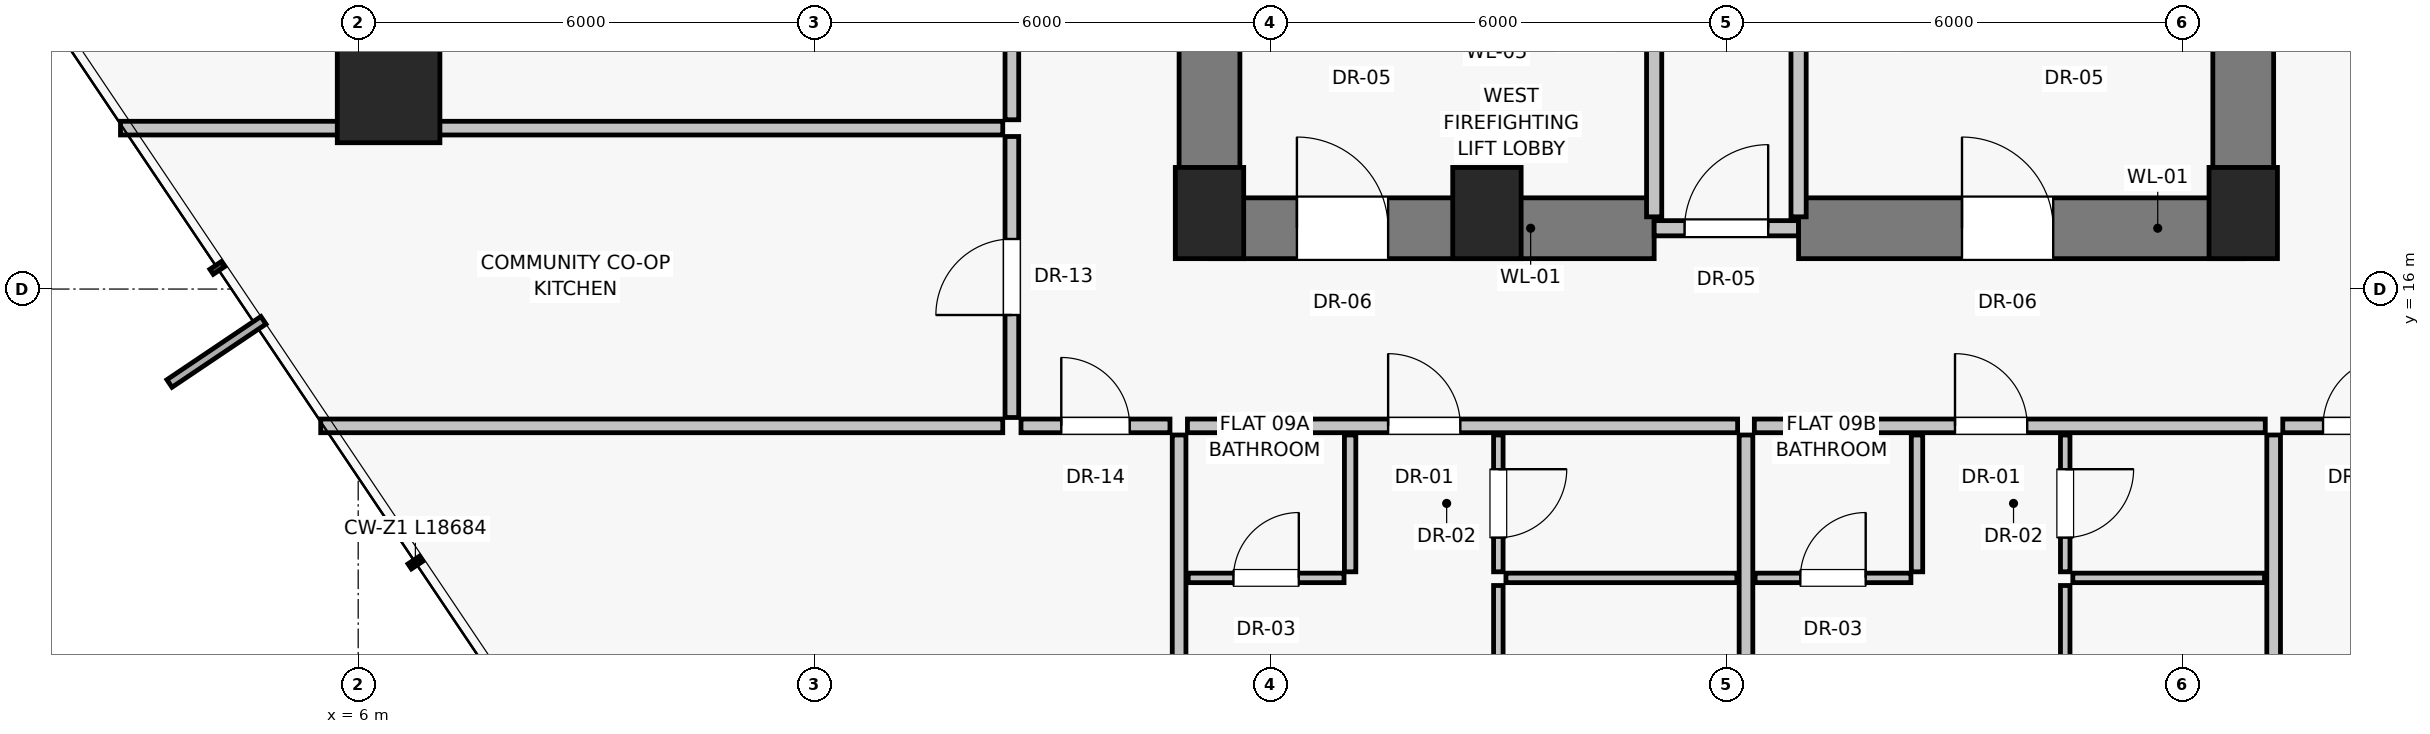
"""IFC4 building model, lengths in metres.
Left out: names, types, materials, properties, quantities, classifications, styles, units other than length and angle.
Written with IfcOpenShell. Run it as: python <this file> out.ifc"""

import sys

from ifc_helpers import new_model, si_unit, direction, frame, frame_2d, origin, origin_2d, place, context, subcontext, project, spatial, rectangle, extrude, source, transform, mapped, element, fill, save


model = new_model("IFC4")
c1 = context("Model", 3, precision=1e-05, world=origin(), true_north=direction((0.0, 1.0)))
c2 = subcontext(c1, "Body", "Model", "MODEL_VIEW")
j1 = project(units=[si_unit("LENGTHUNIT", "METRE"), si_unit("PLANEANGLEUNIT", "RADIAN")], contexts=[c1])
p1 = place(None, origin())
s1 = spatial("IfcSite", under=j1, at=p1, CompositionType="ELEMENT")
p2 = place(p1, origin())
s2 = spatial("IfcBuilding", under=s1, at=p2, CompositionType="ELEMENT")
p3 = place(p2, frame((0.0, 0.0, 37.05)))
s3 = spatial("IfcBuildingStorey", under=s2, at=p3, CompositionType="ELEMENT", Elevation=37.05)
for number, where, z_axis, x_axis in (
    (1, (17.2, 17.0, 0.0), (0.0, 0.0, 1.0), (1.0, 0.0, 0.0)),
    (2, (20.85, 17.0, 0.0), (0.0, 0.0, 1.0), (1.0, 0.0, 0.0)),
    (3, (30.8, 17.0, 0.0), (0.0, 0.0, 1.0), (1.0, 0.0, 0.0)),
):
    element("IfcColumn", number, at=place(p3, frame(where, z_axis=z_axis, x_axis=x_axis)), inside=s3, PredefinedType="PILASTER", context=c2, shape_type="SweptSolid", body=[
        extrude(rectangle(XDim=0.9, YDim=1.2, at=origin_2d()), origin(), (0.0, 0.0, 1.0), 3.25),
    ])
p4 = place(p3, frame((6.4, 18.6, 0.0), z_axis=(0.0, 0.0, 1.0), x_axis=(1.0, 0.0, 0.0)))
e4 = element("IfcColumn", 4, at=p4, inside=s3, PredefinedType="COLUMN", context=c2, shape_type="SweptSolid", body=[
    extrude(rectangle(XDim=1.35, YDim=1.35, at=origin_2d()), origin(), (0.0, 0.0, 1.0), 3.25),
])
for number, where, z_axis, x_axis in (
    (5, (17.2, 16.8, 0.0), (0.0, 0.0, 1.0), (0.0, 1.0, 0.0)),
    (6, (30.8, 16.8, 0.0), (0.0, 0.0, 1.0), (0.0, 1.0, 0.0)),
):
    element("IfcWall", number, at=place(p3, frame(where, z_axis=z_axis, x_axis=x_axis)), inside=s3, PredefinedType="SHEAR", context=c2, shape_type="SweptSolid", body=[
        extrude(rectangle(XDim=14.2, YDim=0.8, at=frame_2d((7.1, 0.0))), origin(), (0.0, 0.0, 1.0), 3.0),
    ])
p5 = place(p3, frame((17.2, 16.8, 0.0), z_axis=(0.0, 0.0, 1.0), x_axis=(1.0, 0.0, 0.0)))
e7 = element("IfcWall", 7, at=p5, inside=s3, PredefinedType="SHEAR", context=c2, shape_type="SweptSolid", body=[
    extrude(rectangle(XDim=5.85, YDim=0.8, at=frame_2d((2.925, 0.0))), origin(), (0.0, 0.0, 1.0), 3.0),
])
p6 = place(p5, frame((1.15, 0.0, 0.0)))
e8 = element("IfcOpeningElement", 8, at=p6, cuts=e7, PredefinedType="OPENING", context=c2, shape_type="SweptSolid", body=[
    extrude(rectangle(XDim=1.2, YDim=2.03, at=frame_2d((0.6, 1.015))), frame((0.0, 0.41, 0.0), z_axis=(0.0, -1.0, 0.0), x_axis=(1.0, 0.0, 0.0)), (0.0, 0.0, 1.0), 0.82),
])
p7 = place(p3, frame((23.05, 16.8, 0.0), z_axis=(0.0, 0.0, 1.0), x_axis=(1.0, 0.0, 0.0)))
e9 = element("IfcWall", 9, at=p7, inside=s3, PredefinedType="SOLIDWALL", context=c2, shape_type="SweptSolid", body=[
    extrude(rectangle(XDim=1.9, YDim=0.2, at=frame_2d((0.95, 0.0))), origin(), (0.0, 0.0, 1.0), 2.15),
])
p8 = place(p7, frame((0.4, 0.0, 0.0)))
e10 = element("IfcOpeningElement", 10, at=p8, cuts=e9, PredefinedType="OPENING", context=c2, shape_type="SweptSolid", body=[
    extrude(rectangle(XDim=1.1, YDim=2.03, at=frame_2d((0.55, 1.015))), frame((0.0, 0.11, 0.0), z_axis=(0.0, -1.0, 0.0), x_axis=(1.0, 0.0, 0.0)), (0.0, 0.0, 1.0), 0.22),
])
p9 = place(p3, frame((24.95, 16.8, 0.0), z_axis=(0.0, 0.0, 1.0), x_axis=(1.0, 0.0, 0.0)))
e11 = element("IfcWall", 11, at=p9, inside=s3, PredefinedType="SHEAR", context=c2, shape_type="SweptSolid", body=[
    extrude(rectangle(XDim=5.85, YDim=0.8, at=frame_2d((2.925, 0.0))), origin(), (0.0, 0.0, 1.0), 3.0),
])
p10 = place(p9, frame((2.15, 0.0, 0.0)))
e12 = element("IfcOpeningElement", 12, at=p10, cuts=e11, PredefinedType="OPENING", context=c2, shape_type="SweptSolid", body=[
    extrude(rectangle(XDim=1.2, YDim=2.03, at=frame_2d((0.6, 1.015))), frame((0.0, 0.41, 0.0), z_axis=(0.0, -1.0, 0.0), x_axis=(1.0, 0.0, 0.0)), (0.0, 0.0, 1.0), 0.82),
])
for number, where, z_axis, x_axis in (
    (13, (23.05, 16.95, 0.0), (0.0, 0.0, 1.0), (0.0, 1.0, 0.0)),
    (14, (24.95, 16.95, 0.0), (0.0, 0.0, 1.0), (0.0, 1.0, 0.0)),
):
    element("IfcWall", number, at=place(p3, frame(where, z_axis=z_axis, x_axis=x_axis)), inside=s3, PredefinedType="SOLIDWALL", context=c2, shape_type="SweptSolid", body=[
        extrude(rectangle(XDim=5.6, YDim=0.2, at=frame_2d((2.8, 0.0))), origin(), (0.0, 0.0, 1.0), 3.0),
    ])
p11 = place(p3, frame((16.8, 14.08, 0.0), z_axis=(0.0, 0.0, 1.0), x_axis=(0.0, -1.0, 0.0)))
e15 = element("IfcWall", 15, at=p11, inside=s3, PredefinedType="PARTITIONING", context=c2, shape_type="SweptSolid", body=[
    extrude(rectangle(XDim=11.437, YDim=0.18, at=frame_2d((5.718, 0.0))), origin(), (0.0, 0.0, 1.0), 3.0),
])
p12 = place(p3, frame((31.2, 14.08, 0.0), z_axis=(0.0, 0.0, 1.0), x_axis=(0.0, -1.0, 0.0)))
e16 = element("IfcWall", 16, at=p12, inside=s3, PredefinedType="PARTITIONING", context=c2, shape_type="SweptSolid", body=[
    extrude(rectangle(XDim=10.45, YDim=0.18, at=frame_2d((5.225, 0.0))), origin(), (0.0, 0.0, 1.0), 3.0),
])
p13 = place(p3, frame((16.91, 14.2, 0.0), z_axis=(0.0, 0.0, 1.0), x_axis=(1.0, 0.0, 0.0)))
e17 = element("IfcWall", 17, at=p13, inside=s3, PredefinedType="PARTITIONING", context=c2, shape_type="SweptSolid", body=[
    extrude(rectangle(XDim=7.238, YDim=0.18, at=frame_2d((3.619, 0.0))), origin(), (0.0, 0.0, 1.0), 3.0),
])
p14 = place(p13, frame((2.64, 0.0, 0.0)))
e18 = element("IfcOpeningElement", 18, at=p14, cuts=e17, PredefinedType="OPENING", context=c2, shape_type="SweptSolid", body=[
    extrude(rectangle(XDim=0.95, YDim=2.02, at=frame_2d((0.475, 1.01))), frame((0.0, 0.1, 0.0), z_axis=(0.0, -1.0, 0.0), x_axis=(1.0, 0.0, 0.0)), (0.0, 0.0, 1.0), 0.2),
])
p15 = place(p3, frame((19.05, 14.08, 0.0), z_axis=(0.0, 0.0, 1.0), x_axis=(0.0, -1.0, 0.0)))
e19 = element("IfcWall", 19, at=p15, inside=s3, PredefinedType="PARTITIONING", context=c2, shape_type="SweptSolid", body=[
    extrude(rectangle(XDim=1.8, YDim=0.15, at=frame_2d((0.9, 0.0))), origin(), (0.0, 0.0, 1.0), 3.0),
])
p16 = place(p3, frame((16.92, 12.2, 0.0), z_axis=(0.0, 0.0, 1.0), x_axis=(1.0, 0.0, 0.0)))
e20 = element("IfcWall", 20, at=p16, inside=s3, PredefinedType="PARTITIONING", context=c2, shape_type="SweptSolid", body=[
    extrude(rectangle(XDim=2.05, YDim=0.125, at=frame_2d((1.025, 0.0))), origin(), (0.0, 0.0, 1.0), 3.0),
])
p17 = place(p16, frame((0.595, 0.0, 0.0)))
e21 = element("IfcOpeningElement", 21, at=p17, cuts=e20, PredefinedType="OPENING", context=c2, shape_type="SweptSolid", body=[
    extrude(rectangle(XDim=0.86, YDim=2.01, at=frame_2d((0.43, 1.005))), frame((0.0, 0.073, 0.0), z_axis=(0.0, -1.0, 0.0), x_axis=(1.0, 0.0, 0.0)), (0.0, 0.0, 1.0), 0.145),
])
p18 = place(p3, frame((21.0, 14.08, 0.0), z_axis=(0.0, 0.0, 1.0), x_axis=(0.0, -1.0, 0.0)))
e22 = element("IfcWall", 22, at=p18, inside=s3, PredefinedType="PARTITIONING", context=c2, shape_type="SweptSolid", body=[
    extrude(rectangle(XDim=1.8, YDim=0.125, at=frame_2d((0.9, 0.0))), origin(), (0.0, 0.0, 1.0), 3.0),
])
p19 = place(p18, frame((0.45, 0.0, 0.0)))
e23 = element("IfcOpeningElement", 23, at=p19, cuts=e22, PredefinedType="OPENING", context=c2, shape_type="SweptSolid", body=[
    extrude(rectangle(XDim=0.9, YDim=2.01, at=frame_2d((0.45, 1.005))), frame((0.0, 0.073, 0.0), z_axis=(0.0, -1.0, 0.0), x_axis=(1.0, 0.0, 0.0)), (0.0, 0.0, 1.0), 0.145),
])
p20 = place(p3, frame((21.1, 12.2, 0.0), z_axis=(0.0, 0.0, 1.0), x_axis=(1.0, 0.0, 0.0)))
e24 = element("IfcWall", 24, at=p20, inside=s3, PredefinedType="PARTITIONING", context=c2, shape_type="SweptSolid", body=[
    extrude(rectangle(XDim=3.038, YDim=0.125, at=frame_2d((1.519, 0.0))), origin(), (0.0, 0.0, 1.0), 3.0),
])
p21 = place(p3, frame((21.0, 12.1, 0.0), z_axis=(0.0, 0.0, 1.0), x_axis=(0.0, -1.0, 0.0)))
e25 = element("IfcWall", 25, at=p21, inside=s3, PredefinedType="PARTITIONING", context=c2, shape_type="SweptSolid", body=[
    extrude(rectangle(XDim=9.169, YDim=0.125, at=frame_2d((4.584, 0.0))), origin(), (0.0, 0.0, 1.0), 3.0),
])
p22 = place(p21, frame((2.875, 0.0, 0.0)))
e26 = element("IfcOpeningElement", 26, at=p22, cuts=e25, PredefinedType="OPENING", context=c2, shape_type="SweptSolid", body=[
    extrude(rectangle(XDim=0.9, YDim=2.01, at=frame_2d((0.45, 1.005))), frame((0.0, 0.073, 0.0), z_axis=(0.0, -1.0, 0.0), x_axis=(1.0, 0.0, 0.0)), (0.0, 0.0, 1.0), 0.145),
])
p23 = place(p3, frame((24.258, 14.08, 0.0), z_axis=(0.0, 0.0, 1.0), x_axis=(0.0, -1.0, 0.0)))
e27 = element("IfcWall", 27, at=p23, inside=s3, PredefinedType="PARTITIONING", context=c2, shape_type="SweptSolid", body=[
    extrude(rectangle(XDim=10.926, YDim=0.18, at=frame_2d((5.463, 0.0))), origin(), (0.0, 0.0, 1.0), 3.0),
])
p24 = place(p3, frame((24.368, 14.2, 0.0), z_axis=(0.0, 0.0, 1.0), x_axis=(1.0, 0.0, 0.0)))
e28 = element("IfcWall", 28, at=p24, inside=s3, PredefinedType="PARTITIONING", context=c2, shape_type="SweptSolid", body=[
    extrude(rectangle(XDim=6.722, YDim=0.18, at=frame_2d((3.361, 0.0))), origin(), (0.0, 0.0, 1.0), 3.0),
])
p25 = place(p24, frame((2.64, 0.0, 0.0)))
e29 = element("IfcOpeningElement", 29, at=p25, cuts=e28, PredefinedType="OPENING", context=c2, shape_type="SweptSolid", body=[
    extrude(rectangle(XDim=0.95, YDim=2.02, at=frame_2d((0.475, 1.01))), frame((0.0, 0.1, 0.0), z_axis=(0.0, -1.0, 0.0), x_axis=(1.0, 0.0, 0.0)), (0.0, 0.0, 1.0), 0.2),
])
p26 = place(p3, frame((26.508, 14.08, 0.0), z_axis=(0.0, 0.0, 1.0), x_axis=(0.0, -1.0, 0.0)))
e30 = element("IfcWall", 30, at=p26, inside=s3, PredefinedType="PARTITIONING", context=c2, shape_type="SweptSolid", body=[
    extrude(rectangle(XDim=1.8, YDim=0.15, at=frame_2d((0.9, 0.0))), origin(), (0.0, 0.0, 1.0), 3.0),
])
p27 = place(p3, frame((24.378, 12.2, 0.0), z_axis=(0.0, 0.0, 1.0), x_axis=(1.0, 0.0, 0.0)))
e31 = element("IfcWall", 31, at=p27, inside=s3, PredefinedType="PARTITIONING", context=c2, shape_type="SweptSolid", body=[
    extrude(rectangle(XDim=2.05, YDim=0.125, at=frame_2d((1.025, 0.0))), origin(), (0.0, 0.0, 1.0), 3.0),
])
p28 = place(p27, frame((0.595, 0.0, 0.0)))
e32 = element("IfcOpeningElement", 32, at=p28, cuts=e31, PredefinedType="OPENING", context=c2, shape_type="SweptSolid", body=[
    extrude(rectangle(XDim=0.86, YDim=2.01, at=frame_2d((0.43, 1.005))), frame((0.0, 0.073, 0.0), z_axis=(0.0, -1.0, 0.0), x_axis=(1.0, 0.0, 0.0)), (0.0, 0.0, 1.0), 0.145),
])
p29 = place(p3, frame((28.458, 14.08, 0.0), z_axis=(0.0, 0.0, 1.0), x_axis=(0.0, -1.0, 0.0)))
e33 = element("IfcWall", 33, at=p29, inside=s3, PredefinedType="PARTITIONING", context=c2, shape_type="SweptSolid", body=[
    extrude(rectangle(XDim=1.8, YDim=0.125, at=frame_2d((0.9, 0.0))), origin(), (0.0, 0.0, 1.0), 3.0),
])
p30 = place(p29, frame((0.45, 0.0, 0.0)))
e34 = element("IfcOpeningElement", 34, at=p30, cuts=e33, PredefinedType="OPENING", context=c2, shape_type="SweptSolid", body=[
    extrude(rectangle(XDim=0.9, YDim=2.01, at=frame_2d((0.45, 1.005))), frame((0.0, 0.073, 0.0), z_axis=(0.0, -1.0, 0.0), x_axis=(1.0, 0.0, 0.0)), (0.0, 0.0, 1.0), 0.145),
])
p31 = place(p3, frame((28.558, 12.2, 0.0), z_axis=(0.0, 0.0, 1.0), x_axis=(1.0, 0.0, 0.0)))
e35 = element("IfcWall", 35, at=p31, inside=s3, PredefinedType="PARTITIONING", context=c2, shape_type="SweptSolid", body=[
    extrude(rectangle(XDim=2.522, YDim=0.125, at=frame_2d((1.261, 0.0))), origin(), (0.0, 0.0, 1.0), 3.0),
])
p32 = place(p3, frame((28.458, 12.1, 0.0), z_axis=(0.0, 0.0, 1.0), x_axis=(0.0, -1.0, 0.0)))
e36 = element("IfcWall", 36, at=p32, inside=s3, PredefinedType="PARTITIONING", context=c2, shape_type="SweptSolid", body=[
    extrude(rectangle(XDim=8.658, YDim=0.125, at=frame_2d((4.329, 0.0))), origin(), (0.0, 0.0, 1.0), 3.0),
])
p33 = place(p32, frame((2.702, 0.0, 0.0)))
e37 = element("IfcOpeningElement", 37, at=p33, cuts=e36, PredefinedType="OPENING", context=c2, shape_type="SweptSolid", body=[
    extrude(rectangle(XDim=0.9, YDim=2.01, at=frame_2d((0.45, 1.005))), frame((0.0, 0.073, 0.0), z_axis=(0.0, -1.0, 0.0), x_axis=(1.0, 0.0, 0.0)), (0.0, 0.0, 1.0), 0.145),
])
p34 = place(p3, frame((14.48, 14.2, 0.0), z_axis=(0.0, 0.0, 1.0), x_axis=(-1.0, 0.0, 0.0)))
e38 = element("IfcWall", 38, at=p34, inside=s3, PredefinedType="PARTITIONING", context=c2, shape_type="SweptSolid", body=[
    extrude(rectangle(XDim=8.973, YDim=0.18, at=frame_2d((4.486, 0.0))), origin(), (0.0, 0.0, 1.0), 3.0),
])
p35 = place(p3, frame((14.6, 14.31, 0.0), z_axis=(0.0, 0.0, 1.0), x_axis=(0.0, 1.0, 0.0)))
e39 = element("IfcWall", 39, at=p35, inside=s3, PredefinedType="PARTITIONING", context=c2, shape_type="SweptSolid", body=[
    extrude(rectangle(XDim=3.697, YDim=0.18, at=frame_2d((1.849, 0.0))), origin(), (0.0, 0.0, 1.0), 3.0),
])
p36 = place(p35, frame((1.348, 0.0, 0.0)))
e40 = element("IfcOpeningElement", 40, at=p36, cuts=e39, PredefinedType="OPENING", context=c2, shape_type="SweptSolid", body=[
    extrude(rectangle(XDim=1.0, YDim=2.01, at=frame_2d((0.5, 1.005))), frame((0.0, 0.1, 0.0), z_axis=(0.0, -1.0, 0.0), x_axis=(1.0, 0.0, 0.0)), (0.0, 0.0, 1.0), 0.2),
])
p37 = place(p3, frame((14.6, 18.227, 0.0), z_axis=(0.0, 0.0, 1.0), x_axis=(0.0, 1.0, 0.0)))
e41 = element("IfcWall", 41, at=p37, inside=s3, PredefinedType="PARTITIONING", context=c2, shape_type="SweptSolid", body=[
    extrude(rectangle(XDim=6.171, YDim=0.18, at=frame_2d((3.085, 0.0))), origin(), (0.0, 0.0, 1.0), 3.0),
])
p38 = place(p37, frame((2.585, 0.0, 0.0)))
e42 = element("IfcOpeningElement", 42, at=p38, cuts=e41, PredefinedType="OPENING", context=c2, shape_type="SweptSolid", body=[
    extrude(rectangle(XDim=1.0, YDim=2.01, at=frame_2d((0.5, 1.005))), frame((0.0, 0.1, 0.0), z_axis=(0.0, -1.0, 0.0), x_axis=(1.0, 0.0, 0.0)), (0.0, 0.0, 1.0), 0.2),
])
p39 = place(p3, frame((14.48, 18.117, 0.0), z_axis=(0.0, 0.0, 1.0), x_axis=(-1.0, 0.0, 0.0)))
e43 = element("IfcWall", 43, at=p39, inside=s3, PredefinedType="PARTITIONING", context=c2, shape_type="SweptSolid", body=[
    extrude(rectangle(XDim=11.607, YDim=0.18, at=frame_2d((5.804, 0.0))), origin(), (0.0, 0.0, 1.0), 2.299),
])
p40 = place(p3, frame((14.72, 14.2, 0.0), z_axis=(0.0, 0.0, 1.0), x_axis=(1.0, 0.0, 0.0)))
e44 = element("IfcWall", 44, at=p40, inside=s3, PredefinedType="PARTITIONING", context=c2, shape_type="SweptSolid", body=[
    extrude(rectangle(XDim=1.96, YDim=0.18, at=frame_2d((0.98, 0.0))), origin(), (0.0, 0.0, 1.0), 3.0),
])
p41 = place(p40, frame((0.53, 0.0, 0.0)))
e45 = element("IfcOpeningElement", 45, at=p41, cuts=e44, PredefinedType="OPENING", context=c2, shape_type="SweptSolid", body=[
    extrude(rectangle(XDim=0.9, YDim=2.01, at=frame_2d((0.45, 1.005))), frame((0.0, 0.1, 0.0), z_axis=(0.0, -1.0, 0.0), x_axis=(1.0, 0.0, 0.0)), (0.0, 0.0, 1.0), 0.2),
])
p42 = place(p3, frame((31.32, 14.2, 0.0), z_axis=(0.0, 0.0, 1.0), x_axis=(1.0, 0.0, 0.0)))
e46 = element("IfcWall", 46, at=p42, inside=s3, PredefinedType="PARTITIONING", context=c2, shape_type="SweptSolid", body=[
    extrude(rectangle(XDim=1.96, YDim=0.18, at=frame_2d((0.98, 0.0))), origin(), (0.0, 0.0, 1.0), 3.0),
])
p43 = place(p42, frame((0.53, 0.0, 0.0)))
e47 = element("IfcOpeningElement", 47, at=p43, cuts=e46, PredefinedType="OPENING", context=c2, shape_type="SweptSolid", body=[
    extrude(rectangle(XDim=0.9, YDim=2.01, at=frame_2d((0.45, 1.005))), frame((0.0, 0.1, 0.0), z_axis=(0.0, -1.0, 0.0), x_axis=(1.0, 0.0, 0.0)), (0.0, 0.0, 1.0), 0.2),
])
m1 = source(origin(), c2, "Body", "SweptSolid", [
    extrude(rectangle(XDim=1.2, YDim=2.03, at=frame_2d((0.6, 1.015))), frame((0.0, 0.025, 0.0), z_axis=(0.0, -1.0, 0.0), x_axis=(1.0, 0.0, 0.0)), (0.0, 0.0, 1.0), 0.05),
])
p44 = place(p6, origin())
e48 = element("IfcDoor", 48, at=p44, inside=s3, OperationType="SINGLE_SWING_LEFT", PredefinedType="DOOR", context=c2, shape_type="MappedRepresentation", body=[
    mapped(m1, transform((0.0, 0.0, 0.0), scale=1.0)),
])
fill(e8, e48)
m2 = source(origin(), c2, "Body", "SweptSolid", [
    extrude(rectangle(XDim=1.1, YDim=2.03, at=frame_2d((0.55, 1.015))), frame((0.0, 0.025, 0.0), z_axis=(0.0, -1.0, 0.0), x_axis=(1.0, 0.0, 0.0)), (0.0, 0.0, 1.0), 0.05),
])
p45 = place(p8, origin())
e49 = element("IfcDoor", 49, at=p45, inside=s3, OperationType="SINGLE_SWING_RIGHT", PredefinedType="DOOR", context=c2, shape_type="MappedRepresentation", body=[
    mapped(m2, transform((0.0, 0.0, 0.0), scale=1.0)),
])
fill(e10, e49)
p46 = place(p10, origin())
e50 = element("IfcDoor", 50, at=p46, inside=s3, OperationType="SINGLE_SWING_LEFT", PredefinedType="DOOR", context=c2, shape_type="MappedRepresentation", body=[
    mapped(m1, transform((0.0, 0.0, 0.0), scale=1.0)),
])
fill(e12, e50)
m3 = source(origin(), c2, "Body", "SweptSolid", [
    extrude(rectangle(XDim=0.95, YDim=2.02, at=frame_2d((0.475, 1.01))), frame((0.0, 0.025, 0.0), z_axis=(0.0, -1.0, 0.0), x_axis=(1.0, 0.0, 0.0)), (0.0, 0.0, 1.0), 0.05),
])
p47 = place(p14, origin())
e51 = element("IfcDoor", 51, at=p47, inside=s3, OperationType="SINGLE_SWING_LEFT", PredefinedType="DOOR", context=c2, shape_type="MappedRepresentation", body=[
    mapped(m3, transform((0.0, 0.0, 0.0), scale=1.0)),
])
fill(e18, e51)
m4 = source(origin(), c2, "Body", "SweptSolid", [
    extrude(rectangle(XDim=0.86, YDim=2.01, at=frame_2d((0.43, 1.005))), frame((0.0, 0.025, 0.0), z_axis=(0.0, -1.0, 0.0), x_axis=(1.0, 0.0, 0.0)), (0.0, 0.0, 1.0), 0.05),
])
p48 = place(p17, origin())
e52 = element("IfcDoor", 52, at=p48, inside=s3, OperationType="SINGLE_SWING_RIGHT", PredefinedType="DOOR", context=c2, shape_type="MappedRepresentation", body=[
    mapped(m4, transform((0.0, 0.0, 0.0), scale=1.0)),
])
fill(e21, e52)
m5 = source(origin(), c2, "Body", "SweptSolid", [
    extrude(rectangle(XDim=0.9, YDim=2.01, at=frame_2d((0.45, 1.005))), frame((0.0, 0.025, 0.0), z_axis=(0.0, -1.0, 0.0), x_axis=(1.0, 0.0, 0.0)), (0.0, 0.0, 1.0), 0.05),
])
p49 = place(p19, origin())
e53 = element("IfcDoor", 53, at=p49, inside=s3, OperationType="SINGLE_SWING_LEFT", PredefinedType="DOOR", context=c2, shape_type="MappedRepresentation", body=[
    mapped(m5, transform((0.0, 0.0, 0.0), scale=1.0)),
])
fill(e23, e53)
p50 = place(p25, origin())
e54 = element("IfcDoor", 54, at=p50, inside=s3, OperationType="SINGLE_SWING_LEFT", PredefinedType="DOOR", context=c2, shape_type="MappedRepresentation", body=[
    mapped(m3, transform((0.0, 0.0, 0.0), scale=1.0)),
])
fill(e29, e54)
p51 = place(p28, origin())
e55 = element("IfcDoor", 55, at=p51, inside=s3, OperationType="SINGLE_SWING_RIGHT", PredefinedType="DOOR", context=c2, shape_type="MappedRepresentation", body=[
    mapped(m4, transform((0.0, 0.0, 0.0), scale=1.0)),
])
fill(e32, e55)
p52 = place(p30, origin())
e56 = element("IfcDoor", 56, at=p52, inside=s3, OperationType="SINGLE_SWING_LEFT", PredefinedType="DOOR", context=c2, shape_type="MappedRepresentation", body=[
    mapped(m5, transform((0.0, 0.0, 0.0), scale=1.0)),
])
fill(e34, e56)
m6 = source(origin(), c2, "Body", "SweptSolid", [
    extrude(rectangle(XDim=1.0, YDim=2.01, at=frame_2d((0.5, 1.005))), frame((0.0, 0.025, 0.0), z_axis=(0.0, -1.0, 0.0), x_axis=(1.0, 0.0, 0.0)), (0.0, 0.0, 1.0), 0.05),
])
p53 = place(p36, origin())
e57 = element("IfcDoor", 57, at=p53, inside=s3, OperationType="SINGLE_SWING_LEFT", PredefinedType="DOOR", context=c2, shape_type="MappedRepresentation", body=[
    mapped(m6, transform((0.0, 0.0, 0.0), scale=1.0)),
])
fill(e40, e57)
p54 = place(p41, origin())
e58 = element("IfcDoor", 58, at=p54, inside=s3, OperationType="SINGLE_SWING_LEFT", PredefinedType="DOOR", context=c2, shape_type="MappedRepresentation", body=[
    mapped(m5, transform((0.0, 0.0, 0.0), scale=1.0)),
])
fill(e45, e58)
p55 = place(p43, origin())
e59 = element("IfcDoor", 59, at=p55, inside=s3, OperationType="SINGLE_SWING_RIGHT", PredefinedType="DOOR", context=c2, shape_type="MappedRepresentation", body=[
    mapped(m5, transform((0.0, 0.0, 0.0), scale=1.0)),
])
fill(e47, e59)
save(model, sys.argv[1])
